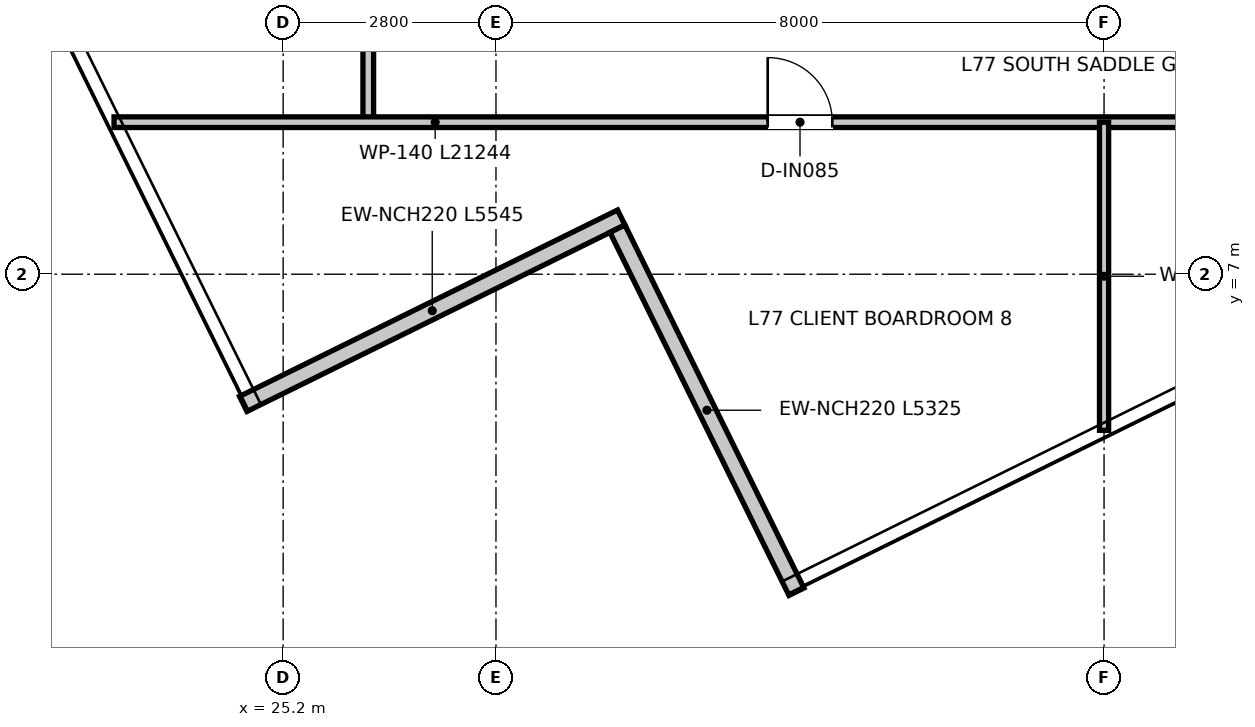
"""IFC4 building model, lengths in metres.
Left out: names, types, materials, properties, quantities, classifications, styles, units other than length and angle.
Written with IfcOpenShell. Run it as: python <this file> out.ifc"""

import sys

from ifc_helpers import new_model, si_unit, direction, frame, frame_2d, origin, place, context, subcontext, project, spatial, rectangle, extrude, element, fill, save


model = new_model("IFC4")
c1 = context("Model", 3, precision=1e-05, world=origin(), true_north=direction((0.0, 1.0)))
c2 = subcontext(c1, "Body", "Model", "MODEL_VIEW")
j1 = project(units=[si_unit("LENGTHUNIT", "METRE"), si_unit("PLANEANGLEUNIT", "RADIAN")], contexts=[c1])
p1 = place(None, origin())
s1 = spatial("IfcSite", under=j1, at=p1, CompositionType="ELEMENT")
p2 = place(p1, origin())
s2 = spatial("IfcBuilding", under=s1, at=p2, CompositionType="ELEMENT")
p3 = place(p2, frame((0.0, 0.0, 314.8)))
s3 = spatial("IfcBuildingStorey", under=s2, at=p3, CompositionType="ELEMENT", Elevation=314.8)
p4 = place(p3, frame((24.675, 5.293, 0.0), z_axis=(0.0, 0.0, 1.0), x_axis=(0.896879244314, 0.442275503639, 0.0)))
e1 = element("IfcWall", 1, at=p4, inside=s3, PredefinedType="ELEMENTEDWALL", context=c2, shape_type="SweptSolid", body=[
    extrude(rectangle(XDim=5.545, YDim=0.22, at=frame_2d((2.772, 0.0))), origin(), (0.0, 0.0, 1.0), 3.59),
])
p5 = place(p3, frame((29.598, 7.599, 0.0), z_axis=(0.0, 0.0, 1.0), x_axis=(0.442291978932, -0.896871119712, 0.0)))
e2 = element("IfcWall", 2, at=p5, inside=s3, PredefinedType="ELEMENTEDWALL", context=c2, shape_type="SweptSolid", body=[
    extrude(rectangle(XDim=5.325, YDim=0.22, at=frame_2d((2.663, 0.0))), origin(), (0.0, 0.0, 1.0), 3.59),
])
p6 = place(p3, frame((26.32, 9.0, 0.0), z_axis=(0.0, 0.0, 1.0), x_axis=(0.0, 1.0, 0.0)))
e3 = element("IfcWall", 3, at=p6, inside=s3, PredefinedType="PARTITIONING", context=c2, shape_type="SweptSolid", body=[
    extrude(rectangle(XDim=19.66, YDim=0.14, at=frame_2d((9.83, 0.0))), origin(), (0.0, 0.0, 1.0), 3.05),
])
p7 = place(p6, frame((18.3, 0.0, 0.0)))
e4 = element("IfcOpeningElement", 4, at=p7, cuts=e3, PredefinedType="OPENING", context=c2, shape_type="SweptSolid", body=[
    extrude(rectangle(XDim=0.9, YDim=2.1, at=frame_2d((0.45, 1.05))), frame((0.0, 0.08, 0.0), z_axis=(0.0, -1.0, 0.0), x_axis=(1.0, 0.0, 0.0)), (0.0, 0.0, 1.0), 0.16),
])
p8 = place(p6, frame((1.95, 0.0, 0.0)))
e5 = element("IfcOpeningElement", 5, at=p8, cuts=e3, PredefinedType="OPENING", context=c2, shape_type="SweptSolid", body=[
    extrude(rectangle(XDim=0.9, YDim=2.1, at=frame_2d((0.45, 1.05))), frame((0.0, 0.08, 0.0), z_axis=(0.0, -1.0, 0.0), x_axis=(1.0, 0.0, 0.0)), (0.0, 0.0, 1.0), 0.16),
])
p9 = place(p6, frame((10.2, 0.0, 0.0)))
e6 = element("IfcOpeningElement", 6, at=p9, cuts=e3, PredefinedType="OPENING", context=c2, shape_type="SweptSolid", body=[
    extrude(rectangle(XDim=0.9, YDim=2.1, at=frame_2d((0.45, 1.05))), frame((0.0, 0.08, 0.0), z_axis=(0.0, -1.0, 0.0), x_axis=(1.0, 0.0, 0.0)), (0.0, 0.0, 1.0), 0.16),
])
p10 = place(p6, frame((14.86, 0.0, 0.0)))
e7 = element("IfcOpeningElement", 7, at=p10, cuts=e3, PredefinedType="OPENING", context=c2, shape_type="SweptSolid", body=[
    extrude(rectangle(XDim=0.9, YDim=2.1, at=frame_2d((0.45, 1.05))), frame((0.0, 0.08, 0.0), z_axis=(0.0, -1.0, 0.0), x_axis=(1.0, 0.0, 0.0)), (0.0, 0.0, 1.0), 0.16),
])
p11 = place(p3, frame((22.975, 9.0, 0.0), z_axis=(0.0, 0.0, 1.0), x_axis=(1.0, 0.0, 0.0)))
e8 = element("IfcWall", 8, at=p11, inside=s3, PredefinedType="PARTITIONING", context=c2, shape_type="SweptSolid", body=[
    extrude(rectangle(XDim=21.244, YDim=0.14, at=frame_2d((10.622, 0.0))), origin(), (0.0, 0.0, 1.0), 3.59),
])
p12 = place(p11, frame((8.6, 0.0, 0.0)))
e9 = element("IfcOpeningElement", 9, at=p12, cuts=e8, PredefinedType="OPENING", context=c2, shape_type="SweptSolid", body=[
    extrude(rectangle(XDim=0.85, YDim=2.1, at=frame_2d((0.425, 1.05))), frame((0.0, 0.08, 0.0), z_axis=(0.0, -1.0, 0.0), x_axis=(1.0, 0.0, 0.0)), (0.0, 0.0, 1.0), 0.16),
])
p13 = place(p11, frame((16.6, 0.0, 0.0)))
e10 = element("IfcOpeningElement", 10, at=p13, cuts=e8, PredefinedType="OPENING", context=c2, shape_type="SweptSolid", body=[
    extrude(rectangle(XDim=0.85, YDim=2.1, at=frame_2d((0.425, 1.05))), frame((0.0, 0.08, 0.0), z_axis=(0.0, -1.0, 0.0), x_axis=(1.0, 0.0, 0.0)), (0.0, 0.0, 1.0), 0.16),
])
p14 = place(p3, frame((36.0, 4.947, 0.0), z_axis=(0.0, 0.0, 1.0), x_axis=(0.0, 1.0, 0.0)))
e11 = element("IfcWall", 11, at=p14, inside=s3, PredefinedType="PARTITIONING", context=c2, shape_type="SweptSolid", body=[
    extrude(rectangle(XDim=4.053, YDim=0.12, at=frame_2d((2.027, 0.0))), origin(), (0.0, 0.0, 1.0), 3.59),
])
p15 = place(p12, origin())
e12 = element("IfcDoor", 12, at=p15, inside=s3, OperationType="SINGLE_SWING_LEFT", PredefinedType="DOOR", context=c2, shape_type="SweptSolid", body=[
    extrude(rectangle(XDim=0.85, YDim=2.1, at=frame_2d((0.425, 1.05))), frame((0.0, 0.025, 0.0), z_axis=(0.0, -1.0, 0.0), x_axis=(1.0, 0.0, 0.0)), (0.0, 0.0, 1.0), 0.05),
])
fill(e9, e12)
save(model, sys.argv[1])
